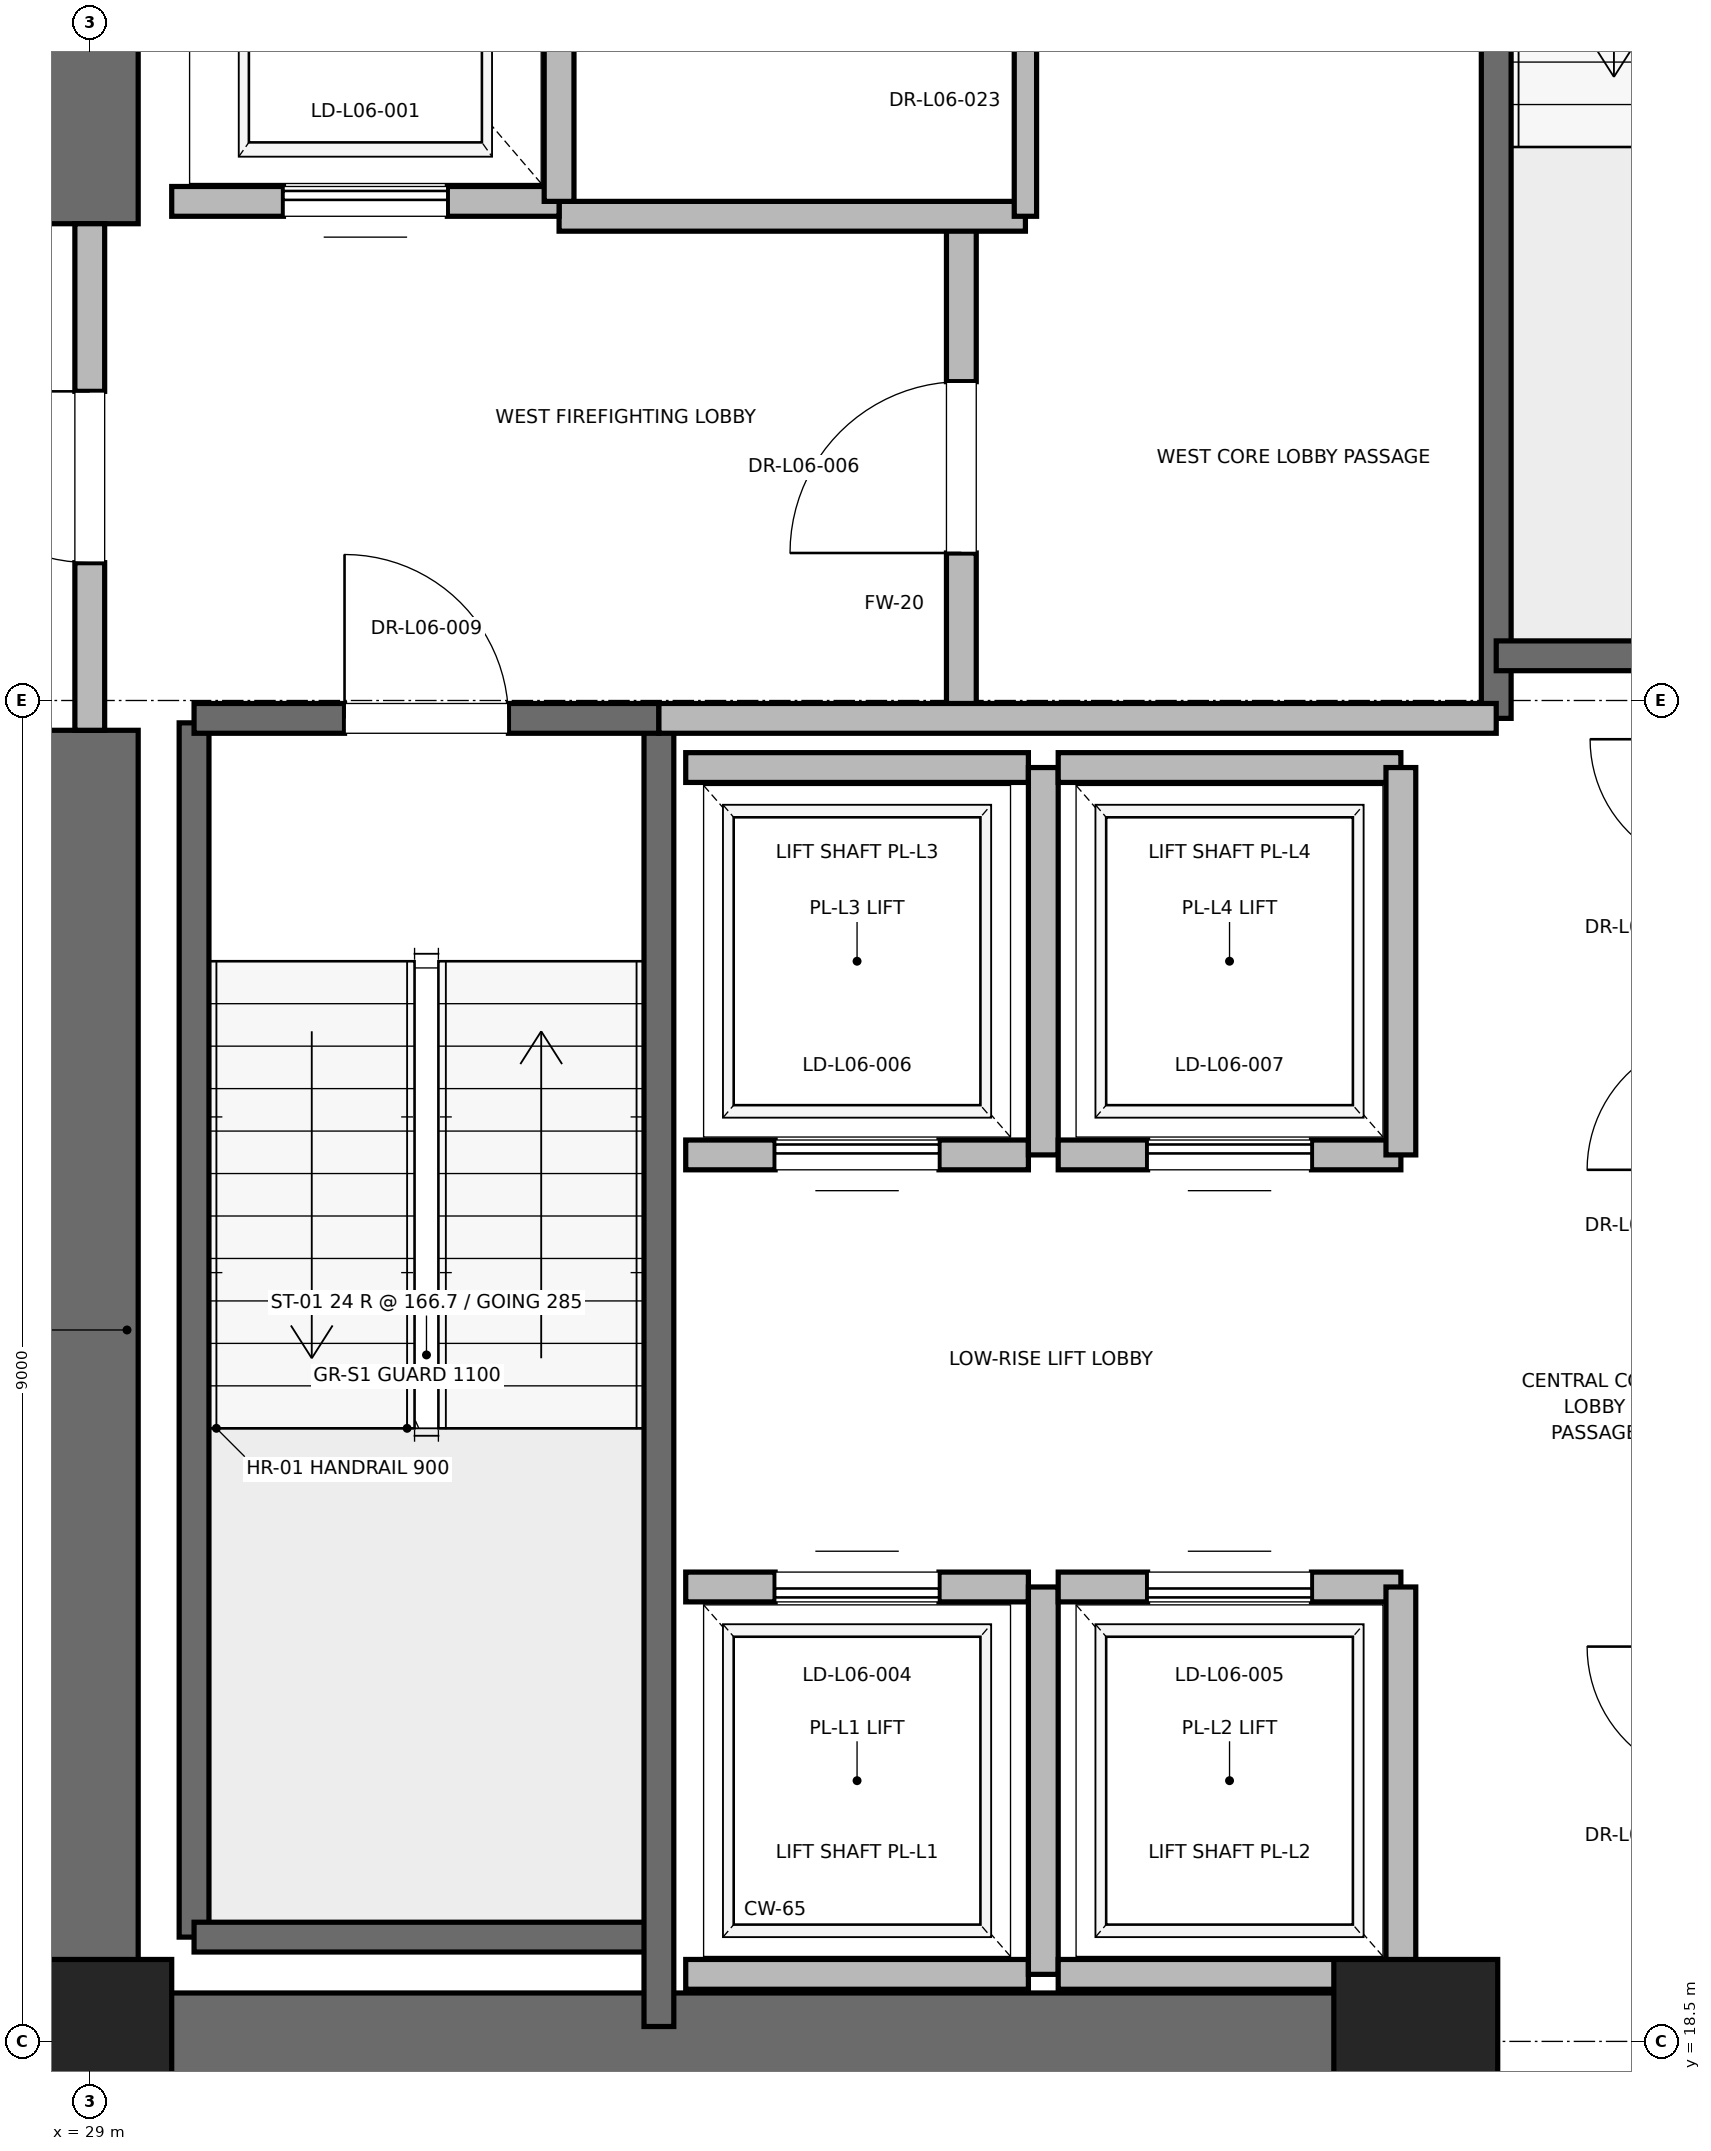
"""IFC4 building model, lengths in metres.
Left out: names, types, materials, properties, quantities, classifications, styles, units other than length and angle.
Written with IfcOpenShell. Run it as: python <this file> out.ifc"""

import sys

from ifc_helpers import new_model, si_unit, direction, frame, frame_2d, origin, origin_2d, place, context, subcontext, project, spatial, rectangle, extrude, element, fill, save


model = new_model("IFC4")
c1 = context("Model", 3, precision=1e-05, world=origin(), true_north=direction((0.0, 1.0)))
c2 = subcontext(c1, "Body", "Model", "MODEL_VIEW")
j1 = project(units=[si_unit("LENGTHUNIT", "METRE"), si_unit("PLANEANGLEUNIT", "RADIAN")], contexts=[c1])
p1 = place(None, origin())
s1 = spatial("IfcSite", under=j1, at=p1, CompositionType="ELEMENT")
p2 = place(p1, origin())
s2 = spatial("IfcBuilding", under=s1, at=p2, CompositionType="ELEMENT")
p3 = place(p2, frame((0.0, 0.0, 31.6)))
s3 = spatial("IfcBuildingStorey", under=s2, at=p3, CompositionType="ELEMENT", Elevation=31.6)
for number, where, z_axis, x_axis in (
    (1, (29.0, 18.5, 0.0), (0.0, 0.0, 1.0), (1.0, 0.0, 0.0)),
    (2, (37.9, 18.5, 0.0), (0.0, 0.0, 1.0), (1.0, 0.0, 0.0)),
):
    element("IfcColumn", number, at=place(p3, frame(where, z_axis=z_axis, x_axis=x_axis)), inside=s3, PredefinedType="PILASTER", context=c2, shape_type="SweptSolid", body=[
        extrude(rectangle(XDim=1.1, YDim=1.1, at=origin_2d()), origin(), (0.0, 0.0, 1.0), 4.0),
    ])
p4 = place(p3, frame((29.0, 18.5, 0.0), z_axis=(0.0, 0.0, 1.0), x_axis=(1.0, 0.0, 0.0)))
e3 = element("IfcWall", 3, at=p4, inside=s3, PredefinedType="SHEAR", context=c2, shape_type="SweptSolid", body=[
    extrude(rectangle(XDim=9.2, YDim=0.65, at=frame_2d((4.6, 0.0))), origin(), (0.0, 0.0, 1.0), 3.76),
])
p5 = place(p3, frame((29.0, 18.5, 0.0), z_axis=(0.0, 0.0, 1.0), x_axis=(0.0, 1.0, 0.0)))
e4 = element("IfcWall", 4, at=p5, inside=s3, PredefinedType="SHEAR", context=c2, shape_type="SweptSolid", body=[
    extrude(rectangle(XDim=8.8, YDim=0.65, at=frame_2d((4.4, 0.0))), origin(), (0.0, 0.0, 1.0), 3.76),
])
p6 = place(p3, frame((29.0, 30.7, 0.0), z_axis=(0.0, 0.0, 1.0), x_axis=(0.0, 1.0, 0.0)))
e5 = element("IfcWall", 5, at=p6, inside=s3, PredefinedType="SHEAR", context=c2, shape_type="SweptSolid", body=[
    extrude(rectangle(XDim=5.8, YDim=0.65, at=frame_2d((2.9, 0.0))), origin(), (0.0, 0.0, 1.0), 3.76),
])
p7 = place(p3, frame((29.7, 19.2, 0.0), z_axis=(0.0, 0.0, 1.0), x_axis=(0.0, 1.0, 0.0)))
e6 = element("IfcWall", 6, at=p7, inside=s3, PredefinedType="SOLIDWALL", context=c2, shape_type="SweptSolid", body=[
    extrude(rectangle(XDim=8.15, YDim=0.2, at=frame_2d((4.075, 0.0))), origin(), (0.0, 0.0, 1.0), 3.76),
])
p8 = place(p3, frame((29.7, 19.2, 0.0), z_axis=(0.0, 0.0, 1.0), x_axis=(1.0, 0.0, 0.0)))
e7 = element("IfcWall", 7, at=p8, inside=s3, PredefinedType="SOLIDWALL", context=c2, shape_type="SweptSolid", body=[
    extrude(rectangle(XDim=3.12, YDim=0.2, at=frame_2d((1.56, 0.0))), origin(), (0.0, 0.0, 1.0), 3.76),
])
p9 = place(p3, frame((32.82, 18.6, 0.0), z_axis=(0.0, 0.0, 1.0), x_axis=(0.0, 1.0, 0.0)))
e8 = element("IfcWall", 8, at=p9, inside=s3, PredefinedType="SOLIDWALL", context=c2, shape_type="SweptSolid", body=[
    extrude(rectangle(XDim=8.78, YDim=0.2, at=frame_2d((4.39, 0.0))), origin(), (0.0, 0.0, 1.0), 3.76),
])
p10 = place(p3, frame((29.7, 27.38, 0.0), z_axis=(0.0, 0.0, 1.0), x_axis=(1.0, 0.0, 0.0)))
e9 = element("IfcWall", 9, at=p10, inside=s3, PredefinedType="SOLIDWALL", context=c2, shape_type="SweptSolid", body=[
    extrude(rectangle(XDim=3.12, YDim=0.2, at=frame_2d((1.56, 0.0))), origin(), (0.0, 0.0, 1.0), 3.76),
])
p11 = place(p10, frame((1.01, 0.0, 0.0)))
e10 = element("IfcOpeningElement", 10, at=p11, cuts=e9, PredefinedType="OPENING", context=c2, shape_type="SweptSolid", body=[
    extrude(rectangle(XDim=1.1, YDim=2.15, at=frame_2d((0.55, 1.075))), frame((0.0, 0.1, 0.0), z_axis=(0.0, -1.0, 0.0), x_axis=(1.0, 0.0, 0.0)), (0.0, 0.0, 1.0), 0.2),
])
p12 = place(p3, frame((38.44, 27.38, 0.0), z_axis=(0.0, 0.0, 1.0), x_axis=(0.0, 1.0, 0.0)))
e11 = element("IfcWall", 11, at=p12, inside=s3, PredefinedType="SOLIDWALL", context=c2, shape_type="SweptSolid", body=[
    extrude(rectangle(XDim=8.87, YDim=0.2, at=frame_2d((4.435, 0.0))), origin(), (0.0, 0.0, 1.0), 3.76),
])
p13 = place(p3, frame((38.44, 27.8, 0.0), z_axis=(0.0, 0.0, 1.0), x_axis=(1.0, 0.0, 0.0)))
e12 = element("IfcWall", 12, at=p13, inside=s3, PredefinedType="SOLIDWALL", context=c2, shape_type="SweptSolid", body=[
    extrude(rectangle(XDim=3.32, YDim=0.2, at=frame_2d((1.66, 0.0))), origin(), (0.0, 0.0, 1.0), 3.76),
])
p14 = place(p3, frame((34.85, 27.38, 0.0), z_axis=(0.0, 0.0, 1.0), x_axis=(0.0, 1.0, 0.0)))
e13 = element("IfcWall", 13, at=p14, inside=s3, PredefinedType="PARTITIONING", context=c2, shape_type="SweptSolid", body=[
    extrude(rectangle(XDim=3.37, YDim=0.2, at=frame_2d((1.685, 0.0))), origin(), (0.0, 0.0, 1.0), 3.76),
])
p15 = place(p14, frame((1.11, 0.0, 0.0)))
e14 = element("IfcOpeningElement", 14, at=p15, cuts=e13, PredefinedType="OPENING", context=c2, shape_type="SweptSolid", body=[
    extrude(rectangle(XDim=1.15, YDim=2.2, at=frame_2d((0.575, 1.1))), frame((0.0, 0.1, 0.0), z_axis=(0.0, -1.0, 0.0), x_axis=(1.0, 0.0, 0.0)), (0.0, 0.0, 1.0), 0.2),
])
p16 = place(p3, frame((29.0, 27.3, 0.0), z_axis=(0.0, 0.0, 1.0), x_axis=(0.0, 1.0, 0.0)))
e15 = element("IfcWall", 15, at=p16, inside=s3, PredefinedType="PARTITIONING", context=c2, shape_type="SweptSolid", body=[
    extrude(rectangle(XDim=3.4, YDim=0.2, at=frame_2d((1.7, 0.0))), origin(), (0.0, 0.0, 1.0), 2.54),
])
p17 = place(p16, frame((1.125, 0.0, 0.0)))
e16 = element("IfcOpeningElement", 16, at=p17, cuts=e15, PredefinedType="OPENING", context=c2, shape_type="SweptSolid", body=[
    extrude(rectangle(XDim=1.15, YDim=2.2, at=frame_2d((0.575, 1.1))), frame((0.0, 0.1, 0.0), z_axis=(0.0, -1.0, 0.0), x_axis=(1.0, 0.0, 0.0)), (0.0, 0.0, 1.0), 0.2),
])
p18 = place(p3, frame((32.82, 27.38, 0.0), z_axis=(0.0, 0.0, 1.0), x_axis=(1.0, 0.0, 0.0)))
e17 = element("IfcWall", 17, at=p18, inside=s3, PredefinedType="PARTITIONING", context=c2, shape_type="SweptSolid", body=[
    extrude(rectangle(XDim=5.62, YDim=0.2, at=frame_2d((2.81, 0.0))), origin(), (0.0, 0.0, 1.0), 3.76),
])
p19 = place(p3, frame((32.15, 30.75, 0.0), z_axis=(0.0, 0.0, 1.0), x_axis=(1.0, 0.0, 0.0)))
e18 = element("IfcWall", 18, at=p19, inside=s3, PredefinedType="PARTITIONING", context=c2, shape_type="SweptSolid", body=[
    extrude(rectangle(XDim=3.13, YDim=0.2, at=frame_2d((1.565, 0.0))), origin(), (0.0, 0.0, 1.0), 3.76),
])
p20 = place(p3, frame((29.55, 30.85, 0.0), z_axis=(0.0, 0.0, 1.0), x_axis=(1.0, 0.0, 0.0)))
e19 = element("IfcWall", 19, at=p20, inside=s3, PredefinedType="SOLIDWALL", context=c2, shape_type="SweptSolid", body=[
    extrude(rectangle(XDim=2.6, YDim=0.2, at=frame_2d((1.3, 0.0))), origin(), (0.0, 0.0, 1.0), 2.54),
])
p21 = place(p20, frame((0.75, 0.0, 0.0)))
e20 = element("IfcOpeningElement", 20, at=p21, cuts=e19, PredefinedType="OPENING", context=c2, shape_type="SweptSolid", body=[
    extrude(rectangle(XDim=1.1, YDim=2.2, at=frame_2d((0.55, 1.1))), frame((0.0, 0.1, 0.0), z_axis=(0.0, -1.0, 0.0), x_axis=(1.0, 0.0, 0.0)), (0.0, 0.0, 1.0), 0.2),
])
p22 = place(p3, frame((32.15, 30.85, 0.0), z_axis=(0.0, 0.0, 1.0), x_axis=(0.0, 1.0, 0.0)))
e21 = element("IfcWall", 21, at=p22, inside=s3, PredefinedType="SOLIDWALL", context=c2, shape_type="SweptSolid", body=[
    extrude(rectangle(XDim=3.0, YDim=0.2, at=frame_2d((1.5, 0.0))), origin(), (0.0, 0.0, 1.0), 3.76),
])
p23 = place(p3, frame((33.0, 18.95, 0.0), z_axis=(0.0, 0.0, 1.0), x_axis=(1.0, 0.0, 0.0)))
e22 = element("IfcWall", 22, at=p23, inside=s3, PredefinedType="SOLIDWALL", context=c2, shape_type="SweptSolid", body=[
    extrude(rectangle(XDim=2.3, YDim=0.2, at=frame_2d((1.15, 0.0))), origin(), (0.0, 0.0, 1.0), 3.76),
])
p24 = place(p3, frame((35.3, 21.55, 0.0), z_axis=(0.0, 0.0, 1.0), x_axis=(-1.0, 0.0, 0.0)))
e23 = element("IfcWall", 23, at=p24, inside=s3, PredefinedType="SOLIDWALL", context=c2, shape_type="SweptSolid", body=[
    extrude(rectangle(XDim=2.3, YDim=0.2, at=frame_2d((1.15, 0.0))), origin(), (0.0, 0.0, 1.0), 3.76),
])
p25 = place(p24, frame((0.6, 0.0, 0.0)))
e24 = element("IfcOpeningElement", 24, at=p25, cuts=e23, PredefinedType="OPENING", context=c2, shape_type="SweptSolid", body=[
    extrude(rectangle(XDim=1.1, YDim=2.2, at=frame_2d((0.55, 1.1))), frame((0.0, 0.1, 0.0), z_axis=(0.0, -1.0, 0.0), x_axis=(1.0, 0.0, 0.0)), (0.0, 0.0, 1.0), 0.2),
])
p26 = place(p3, frame((35.4, 18.95, 0.0), z_axis=(0.0, 0.0, 1.0), x_axis=(0.0, 1.0, 0.0)))
e25 = element("IfcWall", 25, at=p26, inside=s3, PredefinedType="SOLIDWALL", context=c2, shape_type="SweptSolid", body=[
    extrude(rectangle(XDim=2.6, YDim=0.2, at=frame_2d((1.3, 0.0))), origin(), (0.0, 0.0, 1.0), 3.76),
])
p27 = place(p3, frame((35.5, 18.95, 0.0), z_axis=(0.0, 0.0, 1.0), x_axis=(1.0, 0.0, 0.0)))
e26 = element("IfcWall", 26, at=p27, inside=s3, PredefinedType="SOLIDWALL", context=c2, shape_type="SweptSolid", body=[
    extrude(rectangle(XDim=2.3, YDim=0.2, at=frame_2d((1.15, 0.0))), origin(), (0.0, 0.0, 1.0), 2.54),
])
p28 = place(p3, frame((37.8, 21.55, 0.0), z_axis=(0.0, 0.0, 1.0), x_axis=(-1.0, 0.0, 0.0)))
e27 = element("IfcWall", 27, at=p28, inside=s3, PredefinedType="SOLIDWALL", context=c2, shape_type="SweptSolid", body=[
    extrude(rectangle(XDim=2.3, YDim=0.2, at=frame_2d((1.15, 0.0))), origin(), (0.0, 0.0, 1.0), 3.76),
])
p29 = place(p28, frame((0.6, 0.0, 0.0)))
e28 = element("IfcOpeningElement", 28, at=p29, cuts=e27, PredefinedType="OPENING", context=c2, shape_type="SweptSolid", body=[
    extrude(rectangle(XDim=1.1, YDim=2.2, at=frame_2d((0.55, 1.1))), frame((0.0, 0.1, 0.0), z_axis=(0.0, -1.0, 0.0), x_axis=(1.0, 0.0, 0.0)), (0.0, 0.0, 1.0), 0.2),
])
p30 = place(p3, frame((37.8, 18.95, 0.0), z_axis=(0.0, 0.0, 1.0), x_axis=(0.0, 1.0, 0.0)))
e29 = element("IfcWall", 29, at=p30, inside=s3, PredefinedType="SOLIDWALL", context=c2, shape_type="SweptSolid", body=[
    extrude(rectangle(XDim=2.6, YDim=0.2, at=frame_2d((1.3, 0.0))), origin(), (0.0, 0.0, 1.0), 2.54),
])
p31 = place(p3, frame((33.0, 24.45, 0.0), z_axis=(0.0, 0.0, 1.0), x_axis=(1.0, 0.0, 0.0)))
e30 = element("IfcWall", 30, at=p31, inside=s3, PredefinedType="SOLIDWALL", context=c2, shape_type="SweptSolid", body=[
    extrude(rectangle(XDim=2.3, YDim=0.2, at=frame_2d((1.15, 0.0))), origin(), (0.0, 0.0, 1.0), 3.76),
])
p32 = place(p31, frame((0.6, 0.0, 0.0)))
e31 = element("IfcOpeningElement", 31, at=p32, cuts=e30, PredefinedType="OPENING", context=c2, shape_type="SweptSolid", body=[
    extrude(rectangle(XDim=1.1, YDim=2.2, at=frame_2d((0.55, 1.1))), frame((0.0, 0.1, 0.0), z_axis=(0.0, -1.0, 0.0), x_axis=(1.0, 0.0, 0.0)), (0.0, 0.0, 1.0), 0.2),
])
p33 = place(p3, frame((35.3, 27.05, 0.0), z_axis=(0.0, 0.0, 1.0), x_axis=(-1.0, 0.0, 0.0)))
e32 = element("IfcWall", 32, at=p33, inside=s3, PredefinedType="SOLIDWALL", context=c2, shape_type="SweptSolid", body=[
    extrude(rectangle(XDim=2.3, YDim=0.2, at=frame_2d((1.15, 0.0))), origin(), (0.0, 0.0, 1.0), 3.76),
])
p34 = place(p3, frame((35.4, 24.45, 0.0), z_axis=(0.0, 0.0, 1.0), x_axis=(0.0, 1.0, 0.0)))
e33 = element("IfcWall", 33, at=p34, inside=s3, PredefinedType="SOLIDWALL", context=c2, shape_type="SweptSolid", body=[
    extrude(rectangle(XDim=2.6, YDim=0.2, at=frame_2d((1.3, 0.0))), origin(), (0.0, 0.0, 1.0), 3.76),
])
p35 = place(p3, frame((35.5, 24.45, 0.0), z_axis=(0.0, 0.0, 1.0), x_axis=(1.0, 0.0, 0.0)))
e34 = element("IfcWall", 34, at=p35, inside=s3, PredefinedType="SOLIDWALL", context=c2, shape_type="SweptSolid", body=[
    extrude(rectangle(XDim=2.3, YDim=0.2, at=frame_2d((1.15, 0.0))), origin(), (0.0, 0.0, 1.0), 3.76),
])
p36 = place(p35, frame((0.6, 0.0, 0.0)))
e35 = element("IfcOpeningElement", 35, at=p36, cuts=e34, PredefinedType="OPENING", context=c2, shape_type="SweptSolid", body=[
    extrude(rectangle(XDim=1.1, YDim=2.2, at=frame_2d((0.55, 1.1))), frame((0.0, 0.1, 0.0), z_axis=(0.0, -1.0, 0.0), x_axis=(1.0, 0.0, 0.0)), (0.0, 0.0, 1.0), 0.2),
])
p37 = place(p3, frame((37.8, 27.05, 0.0), z_axis=(0.0, 0.0, 1.0), x_axis=(-1.0, 0.0, 0.0)))
e36 = element("IfcWall", 36, at=p37, inside=s3, PredefinedType="SOLIDWALL", context=c2, shape_type="SweptSolid", body=[
    extrude(rectangle(XDim=2.3, YDim=0.2, at=frame_2d((1.15, 0.0))), origin(), (0.0, 0.0, 1.0), 3.76),
])
p38 = place(p3, frame((37.8, 24.45, 0.0), z_axis=(0.0, 0.0, 1.0), x_axis=(0.0, 1.0, 0.0)))
e37 = element("IfcWall", 37, at=p38, inside=s3, PredefinedType="SOLIDWALL", context=c2, shape_type="SweptSolid", body=[
    extrude(rectangle(XDim=2.6, YDim=0.2, at=frame_2d((1.3, 0.0))), origin(), (0.0, 0.0, 1.0), 3.76),
])
p39 = place(p3, frame((35.28, 30.75, 0.0), z_axis=(0.0, 0.0, 1.0), x_axis=(0.0, 1.0, 0.0)))
e38 = element("IfcWall", 38, at=p39, inside=s3, PredefinedType="PARTITIONING", context=c2, shape_type="SweptSolid", body=[
    extrude(rectangle(XDim=3.2, YDim=0.15, at=frame_2d((1.6, 0.0))), origin(), (0.0, 0.0, 1.0), 2.85),
])
p40 = place(p39, frame((1.15, 0.0, 0.0)))
e39 = element("IfcOpeningElement", 39, at=p40, cuts=e38, PredefinedType="OPENING", context=c2, shape_type="SweptSolid", body=[
    extrude(rectangle(XDim=0.9, YDim=2.1, at=frame_2d((0.45, 1.05))), frame((0.0, 0.075, 0.0), z_axis=(0.0, -1.0, 0.0), x_axis=(1.0, 0.0, 0.0)), (0.0, 0.0, 1.0), 0.15),
])
p41 = place(p11, origin())
e40 = element("IfcDoor", 40, at=p41, inside=s3, OperationType="SINGLE_SWING_LEFT", PredefinedType="DOOR", context=c2, shape_type="SweptSolid", body=[
    extrude(rectangle(XDim=1.1, YDim=2.15, at=frame_2d((0.55, 1.075))), frame((0.0, 0.025, 0.0), z_axis=(0.0, -1.0, 0.0), x_axis=(1.0, 0.0, 0.0)), (0.0, 0.0, 1.0), 0.05),
])
fill(e10, e40)
p42 = place(p15, origin())
e41 = element("IfcDoor", 41, at=p42, inside=s3, OperationType="SINGLE_SWING_LEFT", PredefinedType="DOOR", context=c2, shape_type="SweptSolid", body=[
    extrude(rectangle(XDim=1.15, YDim=2.2, at=frame_2d((0.575, 1.1))), frame((0.0, 0.025, 0.0), z_axis=(0.0, -1.0, 0.0), x_axis=(1.0, 0.0, 0.0)), (0.0, 0.0, 1.0), 0.05),
])
fill(e14, e41)
p43 = place(p17, origin())
e42 = element("IfcDoor", 42, at=p43, inside=s3, OperationType="SINGLE_SWING_RIGHT", PredefinedType="DOOR", context=c2, shape_type="SweptSolid", body=[
    extrude(rectangle(XDim=1.15, YDim=2.2, at=frame_2d((0.575, 1.1))), frame((0.0, 0.025, 0.0), z_axis=(0.0, -1.0, 0.0), x_axis=(1.0, 0.0, 0.0)), (0.0, 0.0, 1.0), 0.05),
])
fill(e16, e42)
p44 = place(p21, origin())
e43 = element("IfcDoor", 43, at=p44, inside=s3, OperationType="SLIDING_TO_RIGHT", PredefinedType="DOOR", context=c2, shape_type="SweptSolid", body=[
    extrude(rectangle(XDim=1.1, YDim=2.2, at=frame_2d((0.55, 1.1))), frame((0.0, 0.025, 0.0), z_axis=(0.0, -1.0, 0.0), x_axis=(1.0, 0.0, 0.0)), (0.0, 0.0, 1.0), 0.05),
])
fill(e20, e43)
p45 = place(p25, origin())
e44 = element("IfcDoor", 44, at=p45, inside=s3, OperationType="SLIDING_TO_RIGHT", PredefinedType="DOOR", context=c2, shape_type="SweptSolid", body=[
    extrude(rectangle(XDim=1.1, YDim=2.2, at=frame_2d((0.55, 1.1))), frame((0.0, 0.025, 0.0), z_axis=(0.0, -1.0, 0.0), x_axis=(1.0, 0.0, 0.0)), (0.0, 0.0, 1.0), 0.05),
])
fill(e24, e44)
p46 = place(p29, origin())
e45 = element("IfcDoor", 45, at=p46, inside=s3, OperationType="SLIDING_TO_RIGHT", PredefinedType="DOOR", context=c2, shape_type="SweptSolid", body=[
    extrude(rectangle(XDim=1.1, YDim=2.2, at=frame_2d((0.55, 1.1))), frame((0.0, 0.025, 0.0), z_axis=(0.0, -1.0, 0.0), x_axis=(1.0, 0.0, 0.0)), (0.0, 0.0, 1.0), 0.05),
])
fill(e28, e45)
p47 = place(p32, origin())
e46 = element("IfcDoor", 46, at=p47, inside=s3, OperationType="SLIDING_TO_RIGHT", PredefinedType="DOOR", context=c2, shape_type="SweptSolid", body=[
    extrude(rectangle(XDim=1.1, YDim=2.2, at=frame_2d((0.55, 1.1))), frame((0.0, 0.025, 0.0), z_axis=(0.0, -1.0, 0.0), x_axis=(1.0, 0.0, 0.0)), (0.0, 0.0, 1.0), 0.05),
])
fill(e31, e46)
p48 = place(p36, origin())
e47 = element("IfcDoor", 47, at=p48, inside=s3, OperationType="SLIDING_TO_RIGHT", PredefinedType="DOOR", context=c2, shape_type="SweptSolid", body=[
    extrude(rectangle(XDim=1.1, YDim=2.2, at=frame_2d((0.55, 1.1))), frame((0.0, 0.025, 0.0), z_axis=(0.0, -1.0, 0.0), x_axis=(1.0, 0.0, 0.0)), (0.0, 0.0, 1.0), 0.05),
])
fill(e35, e47)
save(model, sys.argv[1])
